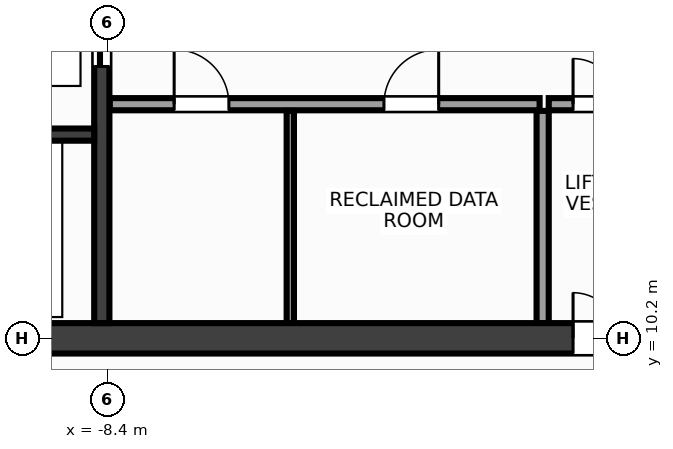
"""IFC4 building model, lengths in metres.
Left out: names, types, materials, properties, quantities, classifications, styles, units other than length and angle.
Written with IfcOpenShell. Run it as: python <this file> out.ifc"""

import sys

from ifc_helpers import new_model, si_unit, direction, frame, frame_2d, origin, place, context, subcontext, project, spatial, rectangle, extrude, source, transform, mapped, element, fill, save


model = new_model("IFC4")
c1 = context("Model", 3, precision=1e-05, world=origin(), true_north=direction((0.0, 1.0)))
c2 = subcontext(c1, "Body", "Model", "MODEL_VIEW")
j1 = project(units=[si_unit("LENGTHUNIT", "METRE"), si_unit("PLANEANGLEUNIT", "RADIAN")], contexts=[c1])
p1 = place(None, origin())
s1 = spatial("IfcSite", under=j1, at=p1, CompositionType="ELEMENT")
p2 = place(p1, origin())
s2 = spatial("IfcBuilding", under=s1, at=p2, CompositionType="ELEMENT")
p3 = place(p2, frame((0.0, 0.0, 225.2)))
s3 = spatial("IfcBuildingStorey", under=s2, at=p3, CompositionType="ELEMENT", Elevation=225.2)
m1 = source(origin(), c2, "Body", "SweptSolid", [
    extrude(rectangle(XDim=31.7, YDim=0.5, at=frame_2d((15.85, 0.0))), origin(), (0.0, 0.0, 1.0), 3.6),
])
p4 = place(p3, frame((-15.85, 10.2, 0.0), z_axis=(0.0, 0.0, 1.0), x_axis=(1.0, 0.0, 0.0)))
e1 = element("IfcWall", 1, at=p4, inside=s3, PredefinedType="SHEAR", context=c2, shape_type="MappedRepresentation", body=[
    mapped(m1, transform((0.0, 0.0, 0.0), x_axis=(1.0, 0.0, 0.0), y_axis=(0.0, 1.0, 0.0), z_axis=(0.0, 0.0, 1.0), scale=1.0)),
])
p5 = place(p4, frame((1.7, 0.0, 0.0)))
e2 = element("IfcOpeningElement", 2, at=p5, cuts=e1, PredefinedType="OPENING", context=c2, shape_type="SweptSolid", body=[
    extrude(rectangle(XDim=1.6, YDim=2.15, at=frame_2d((0.8, 1.075))), frame((0.0, 0.262, 0.0), z_axis=(0.0, -1.0, 0.0), x_axis=(1.0, 0.0, 0.0)), (0.0, 0.0, 1.0), 0.524),
])
p6 = place(p4, frame((28.4, 0.0, 0.0)))
e3 = element("IfcOpeningElement", 3, at=p6, cuts=e1, PredefinedType="OPENING", context=c2, shape_type="SweptSolid", body=[
    extrude(rectangle(XDim=1.6, YDim=2.15, at=frame_2d((0.8, 1.075))), frame((0.0, 0.262, 0.0), z_axis=(0.0, -1.0, 0.0), x_axis=(1.0, 0.0, 0.0)), (0.0, 0.0, 1.0), 0.524),
])
p7 = place(p4, frame((15.1, 0.0, 0.0)))
e4 = element("IfcOpeningElement", 4, at=p7, cuts=e1, PredefinedType="OPENING", context=c2, shape_type="SweptSolid", body=[
    extrude(rectangle(XDim=1.5, YDim=2.2, at=frame_2d((0.75, 1.1))), frame((0.0, 0.262, 0.0), z_axis=(0.0, -1.0, 0.0), x_axis=(1.0, 0.0, 0.0)), (0.0, 0.0, 1.0), 0.524),
])
m2 = source(origin(), c2, "Body", "SweptSolid", [
    extrude(rectangle(XDim=13.1, YDim=0.25, at=frame_2d((6.55, 0.0))), origin(), (0.0, 0.0, 1.0), 3.6),
])
p8 = place(p3, frame((-8.5, 10.45, 0.0), z_axis=(0.0, 0.0, 1.0), x_axis=(0.0, 1.0, 0.0)))
e5 = element("IfcWall", 5, at=p8, inside=s3, PredefinedType="SHEAR", context=c2, shape_type="MappedRepresentation", body=[
    mapped(m2, transform((0.0, 0.0, 0.0), x_axis=(1.0, 0.0, 0.0), y_axis=(0.0, 1.0, 0.0), z_axis=(0.0, 0.0, 1.0), scale=1.0)),
])
p9 = place(p8, frame((4.22, 0.0, 0.0)))
e6 = element("IfcOpeningElement", 6, at=p9, cuts=e5, PredefinedType="OPENING", context=c2, shape_type="SweptSolid", body=[
    extrude(rectangle(XDim=1.1, YDim=2.15, at=frame_2d((0.55, 1.075))), frame((0.0, 0.137, 0.0), z_axis=(0.0, -1.0, 0.0), x_axis=(1.0, 0.0, 0.0)), (0.0, 0.0, 1.0), 0.274),
])
p10 = place(p8, frame((6.14, 0.0, 0.0)))
e7 = element("IfcOpeningElement", 7, at=p10, cuts=e5, PredefinedType="OPENING", context=c2, shape_type="SweptSolid", body=[
    extrude(rectangle(XDim=1.1, YDim=2.15, at=frame_2d((0.55, 1.075))), frame((0.0, 0.137, 0.0), z_axis=(0.0, -1.0, 0.0), x_axis=(1.0, 0.0, 0.0)), (0.0, 0.0, 1.0), 0.274),
])
p11 = place(p8, frame((8.06, 0.0, 0.0)))
e8 = element("IfcOpeningElement", 8, at=p11, cuts=e5, PredefinedType="OPENING", context=c2, shape_type="SweptSolid", body=[
    extrude(rectangle(XDim=1.1, YDim=2.15, at=frame_2d((0.55, 1.075))), frame((0.0, 0.137, 0.0), z_axis=(0.0, -1.0, 0.0), x_axis=(1.0, 0.0, 0.0)), (0.0, 0.0, 1.0), 0.274),
])
m3 = source(origin(), c2, "Body", "SweptSolid", [
    extrude(rectangle(XDim=2.825, YDim=0.2, at=frame_2d((1.413, 0.0))), origin(), (0.0, 0.0, 1.0), 3.6),
])
p12 = place(p3, frame((-11.45, 13.55, 0.0), z_axis=(0.0, 0.0, 1.0), x_axis=(1.0, 0.0, 0.0)))
e9 = element("IfcWall", 9, at=p12, inside=s3, PredefinedType="SHEAR", context=c2, shape_type="MappedRepresentation", body=[
    mapped(m3, transform((0.0, 0.0, 0.0), x_axis=(1.0, 0.0, 0.0), y_axis=(0.0, 1.0, 0.0), z_axis=(0.0, 0.0, 1.0), scale=1.0)),
])
m4 = source(origin(), c2, "Body", "SweptSolid", [
    extrude(rectangle(XDim=7.07, YDim=0.2, at=frame_2d((3.535, 0.0))), origin(), (0.0, 0.0, 1.0), 3.28),
])
p13 = place(p3, frame((-8.37, 14.05, 0.0), z_axis=(0.0, 0.0, 1.0), x_axis=(1.0, 0.0, 0.0)))
e10 = element("IfcWall", 10, at=p13, inside=s3, PredefinedType="PARTITIONING", context=c2, shape_type="MappedRepresentation", body=[
    mapped(m4, transform((0.0, 0.0, 0.0), x_axis=(1.0, 0.0, 0.0), y_axis=(0.0, 1.0, 0.0), z_axis=(0.0, 0.0, 1.0), scale=1.0)),
])
p14 = place(p13, frame((1.06, 0.0, 0.0)))
e11 = element("IfcOpeningElement", 11, at=p14, cuts=e10, PredefinedType="OPENING", context=c2, shape_type="SweptSolid", body=[
    extrude(rectangle(XDim=0.9, YDim=2.15, at=frame_2d((0.45, 1.075))), frame((0.0, 0.112, 0.0), z_axis=(0.0, -1.0, 0.0), x_axis=(1.0, 0.0, 0.0)), (0.0, 0.0, 1.0), 0.224),
])
p15 = place(p13, frame((4.51, 0.0, 0.0)))
e12 = element("IfcOpeningElement", 12, at=p15, cuts=e10, PredefinedType="OPENING", context=c2, shape_type="SweptSolid", body=[
    extrude(rectangle(XDim=0.9, YDim=2.15, at=frame_2d((0.45, 1.075))), frame((0.0, 0.112, 0.0), z_axis=(0.0, -1.0, 0.0), x_axis=(1.0, 0.0, 0.0)), (0.0, 0.0, 1.0), 0.224),
])
m5 = source(origin(), c2, "Body", "SweptSolid", [
    extrude(rectangle(XDim=3.49, YDim=0.2, at=frame_2d((1.745, 0.0))), origin(), (0.0, 0.0, 1.0), 3.28),
])
p16 = place(p3, frame((-1.25, 10.45, 0.0), z_axis=(0.0, 0.0, 1.0), x_axis=(0.0, 1.0, 0.0)))
e13 = element("IfcWall", 13, at=p16, inside=s3, PredefinedType="PARTITIONING", context=c2, shape_type="MappedRepresentation", body=[
    mapped(m5, transform((0.0, 0.0, 0.0), x_axis=(1.0, 0.0, 0.0), y_axis=(0.0, 1.0, 0.0), z_axis=(0.0, 0.0, 1.0), scale=1.0)),
])
m6 = source(origin(), c2, "Body", "SweptSolid", [
    extrude(rectangle(XDim=2.3, YDim=0.2, at=frame_2d((1.15, 0.0))), origin(), (0.0, 0.0, 1.0), 3.28),
])
p17 = place(p3, frame((-1.15, 14.05, 0.0), z_axis=(0.0, 0.0, 1.0), x_axis=(1.0, 0.0, 0.0)))
e14 = element("IfcWall", 14, at=p17, inside=s3, PredefinedType="PARTITIONING", context=c2, shape_type="MappedRepresentation", body=[
    mapped(m6, transform((0.0, 0.0, 0.0), x_axis=(1.0, 0.0, 0.0), y_axis=(0.0, 1.0, 0.0), z_axis=(0.0, 0.0, 1.0), scale=1.0)),
])
p18 = place(p17, frame((0.4, 0.0, 0.0)))
e15 = element("IfcOpeningElement", 15, at=p18, cuts=e14, PredefinedType="OPENING", context=c2, shape_type="SweptSolid", body=[
    extrude(rectangle(XDim=1.5, YDim=2.2, at=frame_2d((0.75, 1.1))), frame((0.0, 0.112, 0.0), z_axis=(0.0, -1.0, 0.0), x_axis=(1.0, 0.0, 0.0)), (0.0, 0.0, 1.0), 0.224),
])
m7 = source(origin(), c2, "Body", "SweptSolid", [
    extrude(rectangle(XDim=3.49, YDim=0.12, at=frame_2d((1.745, 0.0))), origin(), (0.0, 0.0, 1.0), 3.28),
])
p19 = place(p3, frame((-5.4, 10.45, 0.0), z_axis=(0.0, 0.0, 1.0), x_axis=(0.0, 1.0, 0.0)))
e16 = element("IfcWall", 16, at=p19, inside=s3, PredefinedType="PARTITIONING", context=c2, shape_type="MappedRepresentation", body=[
    mapped(m7, transform((0.0, 0.0, 0.0), x_axis=(1.0, 0.0, 0.0), y_axis=(0.0, 1.0, 0.0), z_axis=(0.0, 0.0, 1.0), scale=1.0)),
])
m8 = source(origin(), c2, "Body", "SweptSolid", [
    extrude(rectangle(XDim=1.1, YDim=2.15, at=frame_2d((0.55, 1.075))), frame((0.0, 0.025, 0.0), z_axis=(0.0, -1.0, 0.0), x_axis=(1.0, 0.0, 0.0)), (0.0, 0.0, 1.0), 0.05),
])
p20 = place(p9, origin())
e17 = element("IfcDoor", 17, at=p20, inside=s3, OperationType="DOUBLE_DOOR_SLIDING", PredefinedType="DOOR", context=c2, shape_type="MappedRepresentation", body=[
    mapped(m8, transform((0.0, 0.0, 0.0), x_axis=(1.0, 0.0, 0.0), y_axis=(0.0, 1.0, 0.0), z_axis=(0.0, 0.0, 1.0), scale=1.0)),
])
fill(e6, e17)
m9 = source(origin(), c2, "Body", "SweptSolid", [
    extrude(rectangle(XDim=0.9, YDim=2.15, at=frame_2d((0.45, 1.075))), frame((0.0, 0.025, 0.0), z_axis=(0.0, -1.0, 0.0), x_axis=(1.0, 0.0, 0.0)), (0.0, 0.0, 1.0), 0.05),
])
p21 = place(p14, origin())
e18 = element("IfcDoor", 18, at=p21, inside=s3, OperationType="SINGLE_SWING_LEFT", PredefinedType="DOOR", context=c2, shape_type="MappedRepresentation", body=[
    mapped(m9, transform((0.0, 0.0, 0.0), x_axis=(1.0, 0.0, 0.0), y_axis=(0.0, 1.0, 0.0), z_axis=(0.0, 0.0, 1.0), scale=1.0)),
])
fill(e11, e18)
p22 = place(p15, origin())
e19 = element("IfcDoor", 19, at=p22, inside=s3, OperationType="SINGLE_SWING_RIGHT", PredefinedType="DOOR", context=c2, shape_type="MappedRepresentation", body=[
    mapped(m9, transform((0.0, 0.0, 0.0), x_axis=(1.0, 0.0, 0.0), y_axis=(0.0, 1.0, 0.0), z_axis=(0.0, 0.0, 1.0), scale=1.0)),
])
fill(e12, e19)
m10 = source(origin(), c2, "Body", "SweptSolid", [
    extrude(rectangle(XDim=1.5, YDim=2.2, at=frame_2d((0.75, 1.1))), frame((0.0, 0.025, 0.0), z_axis=(0.0, -1.0, 0.0), x_axis=(1.0, 0.0, 0.0)), (0.0, 0.0, 1.0), 0.05),
])
p23 = place(p18, origin())
e20 = element("IfcDoor", 20, at=p23, inside=s3, OperationType="DOUBLE_DOOR_SINGLE_SWING", PredefinedType="DOOR", context=c2, shape_type="MappedRepresentation", body=[
    mapped(m10, transform((0.0, 0.0, 0.0), x_axis=(1.0, 0.0, 0.0), y_axis=(0.0, 1.0, 0.0), z_axis=(0.0, 0.0, 1.0), scale=1.0)),
])
fill(e15, e20)
p24 = place(p7, origin())
e21 = element("IfcDoor", 21, at=p24, inside=s3, OperationType="DOUBLE_DOOR_SINGLE_SWING", PredefinedType="DOOR", context=c2, shape_type="MappedRepresentation", body=[
    mapped(m10, transform((0.0, 0.0, 0.0), x_axis=(1.0, 0.0, 0.0), y_axis=(0.0, 1.0, 0.0), z_axis=(0.0, 0.0, 1.0), scale=1.0)),
])
fill(e4, e21)
save(model, sys.argv[1])
